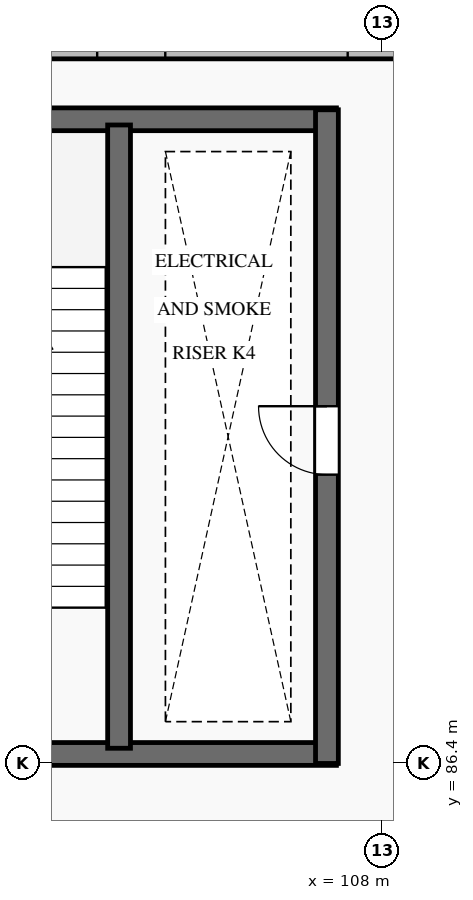
"""IFC4 building model, lengths in metres.
Left out: names, types, materials, properties, quantities, classifications, styles, units other than length and angle.
Written with IfcOpenShell. Run it as: python <this file> out.ifc"""

import sys

from ifc_helpers import new_model, si_unit, direction, frame, frame_2d, origin, place, context, subcontext, project, spatial, rectangle, extrude, element, fill, save


model = new_model("IFC4")
c1 = context("Model", 3, precision=1e-05, world=origin(), true_north=direction((0.0, 1.0)))
c2 = subcontext(c1, "Body", "Model", "MODEL_VIEW")
j1 = project(units=[si_unit("LENGTHUNIT", "METRE"), si_unit("PLANEANGLEUNIT", "RADIAN")], contexts=[c1])
p1 = place(None, origin())
s1 = spatial("IfcSite", under=j1, at=p1, CompositionType="ELEMENT")
p2 = place(p1, origin())
s2 = spatial("IfcBuilding", under=s1, at=p2, CompositionType="ELEMENT")
p3 = place(p2, origin())
s3 = spatial("IfcBuildingStorey", under=s2, at=p3, CompositionType="ELEMENT", Elevation=0.0)
p4 = place(p3, frame((99.755, 95.85, 0.0), z_axis=(0.0, 0.0, 1.0), x_axis=(1.0, 0.0, 0.0)))
e1 = element("IfcWall", 1, at=p4, inside=s3, PredefinedType="SOLIDWALL", context=c2, shape_type="SweptSolid", body=[
    extrude(rectangle(XDim=9.89, YDim=0.36, at=frame_2d((4.945, 0.0))), origin(), (0.0, 0.0, 1.0), 4.92),
])
p5 = place(p4, frame((2.097, 0.0, 0.9)))
e2 = element("IfcOpeningElement", 2, at=p5, cuts=e1, PredefinedType="OPENING", context=c2, shape_type="SweptSolid", body=[
    extrude(rectangle(XDim=2.4, YDim=3.2, at=frame_2d((1.2, 1.6))), frame((0.0, 0.195, 0.0), z_axis=(0.0, -1.0, 0.0), x_axis=(1.0, 0.0, 0.0)), (0.0, 0.0, 1.0), 0.39),
])
p6 = place(p4, frame((5.393, 0.0, 0.9)))
e3 = element("IfcOpeningElement", 3, at=p6, cuts=e1, PredefinedType="OPENING", context=c2, shape_type="SweptSolid", body=[
    extrude(rectangle(XDim=2.4, YDim=3.2, at=frame_2d((1.2, 1.6))), frame((0.0, 0.195, 0.0), z_axis=(0.0, -1.0, 0.0), x_axis=(1.0, 0.0, 0.0)), (0.0, 0.0, 1.0), 0.39),
])
for number, where, z_axis, x_axis in (
    (4, (100.4, 86.525, 0.0), (0.0, 0.0, 1.0), (1.0, 0.0, 0.0)),
    (5, (100.4, 94.875, 0.0), (0.0, 0.0, 1.0), (1.0, 0.0, 0.0)),
):
    element("IfcWall", number, at=place(p3, frame(where, z_axis=z_axis, x_axis=x_axis)), inside=s3, PredefinedType="SHEAR", context=c2, shape_type="SweptSolid", body=[
        extrude(rectangle(XDim=7.0, YDim=0.3, at=frame_2d((3.5, 0.0))), origin(), (0.0, 0.0, 1.0), 6.0),
    ])
p7 = place(p3, frame((107.275, 86.4, 0.0), z_axis=(0.0, 0.0, 1.0), x_axis=(0.0, 1.0, 0.0)))
e6 = element("IfcWall", 6, at=p7, inside=s3, PredefinedType="SHEAR", context=c2, shape_type="SweptSolid", body=[
    extrude(rectangle(XDim=8.6, YDim=0.3, at=frame_2d((4.3, 0.0))), origin(), (0.0, 0.0, 1.0), 6.0),
])
p8 = place(p7, frame((3.8, 0.0, 0.0)))
e7 = element("IfcOpeningElement", 7, at=p8, cuts=e6, PredefinedType="OPENING", context=c2, shape_type="SweptSolid", body=[
    extrude(rectangle(XDim=0.9, YDim=2.05, at=frame_2d((0.45, 1.025))), frame((0.0, 0.165, 0.0), z_axis=(0.0, -1.0, 0.0), x_axis=(1.0, 0.0, 0.0)), (0.0, 0.0, 1.0), 0.33),
])
p9 = place(p3, frame((104.54, 86.6, 0.0), z_axis=(0.0, 0.0, 1.0), x_axis=(0.0, 1.0, 0.0)))
e8 = element("IfcWall", 8, at=p9, inside=s3, PredefinedType="SHEAR", context=c2, shape_type="SweptSolid", body=[
    extrude(rectangle(XDim=8.2, YDim=0.3, at=frame_2d((4.1, 0.0))), origin(), (0.0, 0.0, 1.0), 6.0),
])
p10 = place(p8, origin())
e9 = element("IfcDoor", 9, at=p10, inside=s3, OperationType="SINGLE_SWING_RIGHT", PredefinedType="DOOR", context=c2, shape_type="SweptSolid", body=[
    extrude(rectangle(XDim=0.9, YDim=2.05, at=frame_2d((0.45, 1.025))), frame((0.0, 0.025, 0.0), z_axis=(0.0, -1.0, 0.0), x_axis=(1.0, 0.0, 0.0)), (0.0, 0.0, 1.0), 0.05),
])
fill(e7, e9)
save(model, sys.argv[1])
